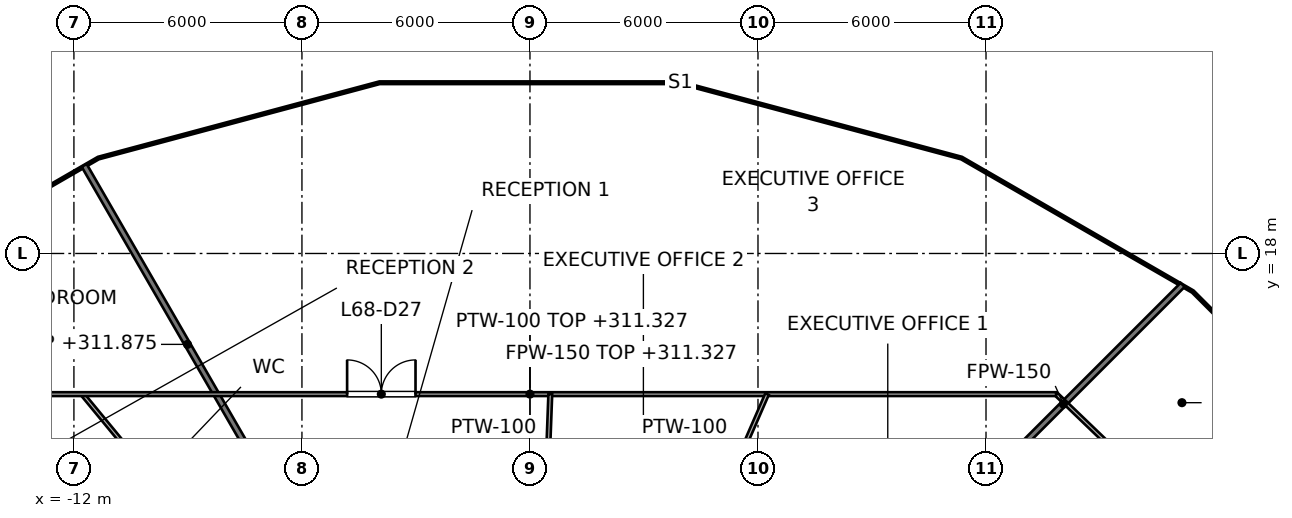
"""IFC4 building model, lengths in metres.
Left out: names, types, materials, properties, quantities, classifications, styles, units other than length and angle.
Written with IfcOpenShell. Run it as: python <this file> out.ifc"""

import sys

from ifc_helpers import new_model, si_unit, direction, frame, frame_2d, origin, place, context, subcontext, project, spatial, rectangle, extrude, element, fill, save


model = new_model("IFC4")
c1 = context("Model", 3, precision=1e-05, world=origin(), true_north=direction((0.0, 1.0)))
c2 = subcontext(c1, "Body", "Model", "MODEL_VIEW")
j1 = project(units=[si_unit("LENGTHUNIT", "METRE"), si_unit("PLANEANGLEUNIT", "RADIAN")], contexts=[c1])
p1 = place(None, origin())
s1 = spatial("IfcSite", under=j1, at=p1, CompositionType="ELEMENT")
p2 = place(p1, origin())
s2 = spatial("IfcBuilding", under=s1, at=p2, CompositionType="ELEMENT")
p3 = place(p2, frame((0.0, 0.0, 308.4)))
s3 = spatial("IfcBuildingStorey", under=s2, at=p3, CompositionType="ELEMENT", Elevation=308.4)
p4 = place(p3, frame((-11.73, 20.317, 0.0), z_axis=(0.0, 0.0, 1.0), x_axis=(0.49996861439, -0.866043523516, 0.0)))
e1 = element("IfcWall", 1, at=p4, inside=s3, PredefinedType="PARTITIONING", context=c2, shape_type="SweptSolid", body=[
    extrude(rectangle(XDim=10.875, YDim=0.15, at=frame_2d((5.438, 0.0))), origin(), (0.0, 0.0, 1.0), 3.475),
])
p5 = place(p3, frame((10.899, 10.899, 0.0), z_axis=(0.0, 0.0, 1.0), x_axis=(0.707106781187, 0.707106781187, 0.0)))
e2 = element("IfcWall", 2, at=p5, inside=s3, PredefinedType="PARTITIONING", context=c2, shape_type="SweptSolid", body=[
    extrude(rectangle(XDim=8.875, YDim=0.15, at=frame_2d((4.437, 0.0))), origin(), (0.0, 0.0, 1.0), 2.995),
])
p6 = place(p3, frame((-11.777, 14.299, 0.0), z_axis=(0.0, 0.0, 1.0), x_axis=(0.63569753872, -0.771938235396, 0.0)))
e3 = element("IfcWall", 3, at=p6, inside=s3, PredefinedType="PARTITIONING", context=c2, shape_type="SweptSolid", body=[
    extrude(rectangle(XDim=4.405, YDim=0.1, at=frame_2d((2.202, 0.0))), origin(), (0.0, 0.0, 1.0), 3.85),
])
p7 = place(p3, frame((13.846, 14.299, 0.0), z_axis=(0.0, 0.0, 1.0), x_axis=(0.72117874289, -0.692749031615, 0.0)))
e4 = element("IfcWall", 4, at=p7, inside=s3, PredefinedType="PARTITIONING", context=c2, shape_type="SweptSolid", body=[
    extrude(rectangle(XDim=11.791, YDim=0.1, at=frame_2d((5.896, 0.0))), origin(), (0.0, 0.0, 1.0), 2.995),
])
p8 = place(p7, frame((5.557, 0.0, 0.0)))
e5 = element("IfcOpeningElement", 5, at=p8, cuts=e4, PredefinedType="OPENING", context=c2, shape_type="SweptSolid", body=[
    extrude(rectangle(XDim=0.9, YDim=2.1, at=frame_2d((0.45, 1.05))), frame((0.0, 0.05, 0.0), z_axis=(0.0, -1.0, 0.0), x_axis=(1.0, 0.0, 0.0)), (0.0, 0.0, 1.0), 0.1),
])
p9 = place(p3, frame((-13.846, 14.299, 0.0), z_axis=(0.0, 0.0, 1.0), x_axis=(1.0, 0.0, 0.0)))
e6 = element("IfcWall", 6, at=p9, inside=s3, PredefinedType="PARTITIONING", context=c2, shape_type="SweptSolid", body=[
    extrude(rectangle(XDim=27.692, YDim=0.1, at=frame_2d((13.846, 0.0))), origin(), (0.0, 0.0, 1.0), 2.927),
])
p10 = place(p9, frame((9.035, 0.0, 0.0)))
e7 = element("IfcOpeningElement", 7, at=p10, cuts=e6, PredefinedType="OPENING", context=c2, shape_type="SweptSolid", body=[
    extrude(rectangle(XDim=1.8, YDim=2.1, at=frame_2d((0.9, 1.05))), frame((0.0, 0.05, 0.0), z_axis=(0.0, -1.0, 0.0), x_axis=(1.0, 0.0, 0.0)), (0.0, 0.0, 1.0), 0.1),
])
p11 = place(p3, frame((4.755, 10.899, 0.0), z_axis=(0.0, 0.0, 1.0), x_axis=(0.399820811011, 0.916593322626, 0.0)))
e8 = element("IfcWall", 8, at=p11, inside=s3, PredefinedType="PARTITIONING", context=c2, shape_type="SweptSolid", body=[
    extrude(rectangle(XDim=3.709, YDim=0.1, at=frame_2d((1.855, 0.0))), origin(), (0.0, 0.0, 1.0), 3.85),
])
p12 = place(p3, frame((0.408, 10.899, 0.0), z_axis=(0.0, 0.0, 1.0), x_axis=(0.037311546962, 0.999303681802, 0.0)))
e9 = element("IfcWall", 9, at=p12, inside=s3, PredefinedType="PARTITIONING", context=c2, shape_type="SweptSolid", body=[
    extrude(rectangle(XDim=3.403, YDim=0.1, at=frame_2d((1.701, 0.0))), origin(), (0.0, 0.0, 1.0), 3.85),
])
p13 = place(p10, origin())
e10 = element("IfcDoor", 10, at=p13, inside=s3, OperationType="DOUBLE_DOOR_SINGLE_SWING", PredefinedType="DOOR", context=c2, shape_type="SweptSolid", body=[
    extrude(rectangle(XDim=1.8, YDim=2.1, at=frame_2d((0.9, 1.05))), frame((0.0, 0.025, 0.0), z_axis=(0.0, -1.0, 0.0), x_axis=(1.0, 0.0, 0.0)), (0.0, 0.0, 1.0), 0.05),
])
fill(e7, e10)
save(model, sys.argv[1])
